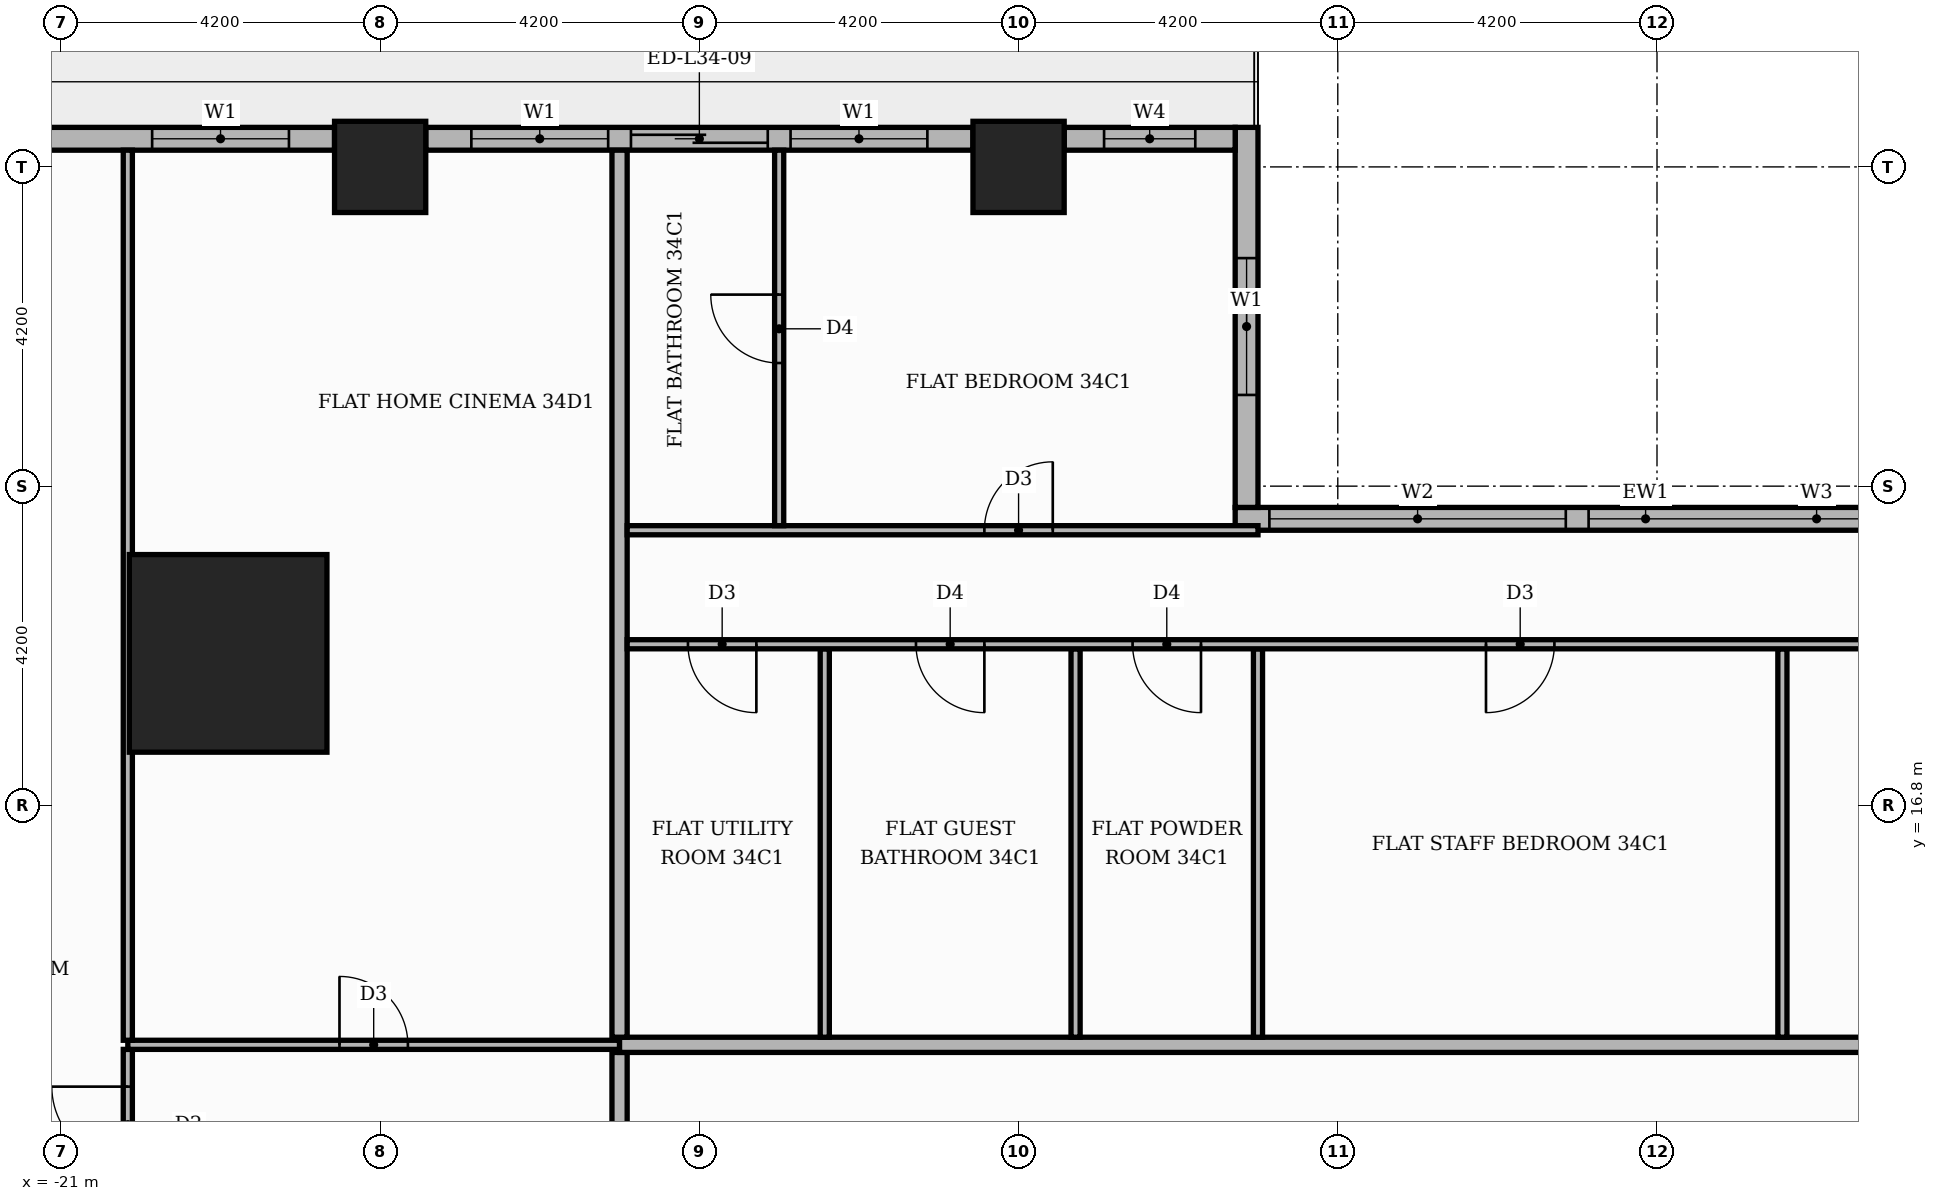
"""IFC4 building model, lengths in metres.
Left out: names, types, materials, properties, quantities, classifications, styles, units other than length and angle.
Written with IfcOpenShell. Run it as: python <this file> out.ifc"""

import sys

from ifc_helpers import new_model, si_unit, direction, frame, frame_2d, origin, origin_2d, place, context, subcontext, project, spatial, rectangle, extrude, element, fill, save


model = new_model("IFC4")
c1 = context("Model", 3, precision=1e-05, world=origin(), true_north=direction((0.0, 1.0)))
c2 = subcontext(c1, "Body", "Model", "MODEL_VIEW")
j1 = project(units=[si_unit("LENGTHUNIT", "METRE"), si_unit("PLANEANGLEUNIT", "RADIAN")], contexts=[c1])
p1 = place(None, origin())
s1 = spatial("IfcSite", under=j1, at=p1, CompositionType="ELEMENT")
p2 = place(p1, origin())
s2 = spatial("IfcBuilding", under=s1, at=p2, CompositionType="ELEMENT")
p3 = place(p2, frame((0.0, 0.0, 145.5)))
s3 = spatial("IfcBuildingStorey", under=s2, at=p3, CompositionType="ELEMENT", Elevation=145.5)
p4 = place(p3, frame((-18.8, 18.8, 0.0), z_axis=(0.0, 0.0, 1.0), x_axis=(1.0, 0.0, 0.0)))
e1 = element("IfcColumn", 1, at=p4, inside=s3, PredefinedType="COLUMN", context=c2, shape_type="SweptSolid", body=[
    extrude(rectangle(XDim=2.6, YDim=2.6, at=origin_2d()), origin(), (0.0, 0.0, 1.0), 3.9),
])
for number, where, z_axis, x_axis in (
    (2, (-8.4, 25.2, 0.0), (0.0, 0.0, 1.0), (1.0, 0.0, 0.0)),
    (3, (-16.8, 25.2, 0.0), (0.0, 0.0, 1.0), (1.0, 0.0, 0.0)),
):
    element("IfcColumn", number, at=place(p3, frame(where, z_axis=z_axis, x_axis=x_axis)), inside=s3, PredefinedType="COLUMN", context=c2, shape_type="SweptSolid", body=[
        extrude(rectangle(XDim=1.2, YDim=1.2, at=origin_2d()), origin(), (0.0, 0.0, 1.0), 3.9),
    ])
p5 = place(p3, frame((5.25, 20.57, 0.0), z_axis=(0.0, 0.0, 1.0), x_axis=(-1.0, 0.0, 0.0)))
e4 = element("IfcWall", 4, at=p5, inside=s3, PredefinedType="STANDARD", context=c2, shape_type="SweptSolid", body=[
    extrude(rectangle(XDim=10.8, YDim=0.3, at=frame_2d((5.4, 0.0))), origin(), (0.0, 0.0, 1.0), 3.48),
])
p6 = place(p5, frame((0.15, 0.0, 0.9)))
e5 = element("IfcOpeningElement", 5, at=p6, cuts=e4, PredefinedType="OPENING", context=c2, shape_type="SweptSolid", body=[
    extrude(rectangle(XDim=6.0, YDim=2.1, at=frame_2d((3.0, 1.05))), frame((0.0, 0.16, 0.0), z_axis=(0.0, -1.0, 0.0), x_axis=(1.0, 0.0, 0.0)), (0.0, 0.0, 1.0), 0.32),
])
p7 = place(p5, frame((6.45, 0.0, 0.9)))
e6 = element("IfcOpeningElement", 6, at=p7, cuts=e4, PredefinedType="OPENING", context=c2, shape_type="SweptSolid", body=[
    extrude(rectangle(XDim=3.9, YDim=2.1, at=frame_2d((1.95, 1.05))), frame((0.0, 0.16, 0.0), z_axis=(0.0, -1.0, 0.0), x_axis=(1.0, 0.0, 0.0)), (0.0, 0.0, 1.0), 0.32),
])
p8 = place(p3, frame((-5.4, 20.72, 0.0), z_axis=(0.0, 0.0, 1.0), x_axis=(0.0, 1.0, 0.0)))
e7 = element("IfcWall", 7, at=p8, inside=s3, PredefinedType="STANDARD", context=c2, shape_type="SweptSolid", body=[
    extrude(rectangle(XDim=5.0, YDim=0.3, at=frame_2d((2.5, 0.0))), origin(), (0.0, 0.0, 1.0), 3.48),
])
p9 = place(p8, frame((1.48, 0.0, 0.9)))
e8 = element("IfcOpeningElement", 8, at=p9, cuts=e7, PredefinedType="OPENING", context=c2, shape_type="SweptSolid", body=[
    extrude(rectangle(XDim=1.8, YDim=2.1, at=frame_2d((0.9, 1.05))), frame((0.0, 0.16, 0.0), z_axis=(0.0, -1.0, 0.0), x_axis=(1.0, 0.0, 0.0)), (0.0, 0.0, 1.0), 0.32),
])
p10 = place(p3, frame((-5.55, 25.57, 0.0), z_axis=(0.0, 0.0, 1.0), x_axis=(-1.0, 0.0, 0.0)))
e9 = element("IfcWall", 9, at=p10, inside=s3, PredefinedType="STANDARD", context=c2, shape_type="SweptSolid", body=[
    extrude(rectangle(XDim=2.25, YDim=0.3, at=frame_2d((1.125, 0.0))), origin(), (0.0, 0.0, 1.0), 3.48),
])
p11 = place(p10, frame((0.525, 0.0, 0.9)))
e10 = element("IfcOpeningElement", 10, at=p11, cuts=e9, PredefinedType="OPENING", context=c2, shape_type="SweptSolid", body=[
    extrude(rectangle(XDim=1.2, YDim=2.1, at=frame_2d((0.6, 1.05))), frame((0.0, 0.16, 0.0), z_axis=(0.0, -1.0, 0.0), x_axis=(1.0, 0.0, 0.0)), (0.0, 0.0, 1.0), 0.32),
])
p12 = place(p3, frame((-9.0, 25.57, 0.0), z_axis=(0.0, 0.0, 1.0), x_axis=(-1.0, 0.0, 0.0)))
e11 = element("IfcWall", 11, at=p12, inside=s3, PredefinedType="STANDARD", context=c2, shape_type="SweptSolid", body=[
    extrude(rectangle(XDim=7.2, YDim=0.3, at=frame_2d((3.6, 0.0))), origin(), (0.0, 0.0, 1.0), 3.48),
])
p13 = place(p12, frame((0.6, 0.0, 0.9)))
e12 = element("IfcOpeningElement", 12, at=p13, cuts=e11, PredefinedType="OPENING", context=c2, shape_type="SweptSolid", body=[
    extrude(rectangle(XDim=1.8, YDim=2.1, at=frame_2d((0.9, 1.05))), frame((0.0, 0.16, 0.0), z_axis=(0.0, -1.0, 0.0), x_axis=(1.0, 0.0, 0.0)), (0.0, 0.0, 1.0), 0.32),
])
p14 = place(p12, frame((2.7, 0.0, 0.0)))
e13 = element("IfcOpeningElement", 13, at=p14, cuts=e11, PredefinedType="OPENING", context=c2, shape_type="SweptSolid", body=[
    extrude(rectangle(XDim=1.8, YDim=2.4, at=frame_2d((0.9, 1.2))), frame((0.0, 0.16, 0.0), z_axis=(0.0, -1.0, 0.0), x_axis=(1.0, 0.0, 0.0)), (0.0, 0.0, 1.0), 0.32),
])
p15 = place(p12, frame((4.8, 0.0, 0.9)))
e14 = element("IfcOpeningElement", 14, at=p15, cuts=e11, PredefinedType="OPENING", context=c2, shape_type="SweptSolid", body=[
    extrude(rectangle(XDim=1.8, YDim=2.1, at=frame_2d((0.9, 1.05))), frame((0.0, 0.16, 0.0), z_axis=(0.0, -1.0, 0.0), x_axis=(1.0, 0.0, 0.0)), (0.0, 0.0, 1.0), 0.32),
])
p16 = place(p3, frame((-17.4, 25.57, 0.0), z_axis=(0.0, 0.0, 1.0), x_axis=(-1.0, 0.0, 0.0)))
e15 = element("IfcWall", 15, at=p16, inside=s3, PredefinedType="STANDARD", context=c2, shape_type="SweptSolid", body=[
    extrude(rectangle(XDim=4.32, YDim=0.3, at=frame_2d((2.16, 0.0))), origin(), (0.0, 0.0, 1.0), 3.48),
])
p17 = place(p16, frame((0.6, 0.0, 0.9)))
e16 = element("IfcOpeningElement", 16, at=p17, cuts=e15, PredefinedType="OPENING", context=c2, shape_type="SweptSolid", body=[
    extrude(rectangle(XDim=1.8, YDim=2.1, at=frame_2d((0.9, 1.05))), frame((0.0, 0.16, 0.0), z_axis=(0.0, -1.0, 0.0), x_axis=(1.0, 0.0, 0.0)), (0.0, 0.0, 1.0), 0.32),
])
p18 = place(p3, frame((-13.65, 11.1, 0.0), z_axis=(0.0, 0.0, 1.0), x_axis=(0.0, 1.0, 0.0)))
e17 = element("IfcWall", 17, at=p18, inside=s3, PredefinedType="PARTITIONING", context=c2, shape_type="SweptSolid", body=[
    extrude(rectangle(XDim=2.45, YDim=0.2, at=frame_2d((1.225, 0.0))), origin(), (0.0, 0.0, 1.0), 3.48),
])
p19 = place(p3, frame((-20.12, 11.61, 0.0), z_axis=(0.0, 0.0, 1.0), x_axis=(0.0, 1.0, 0.0)))
e18 = element("IfcWall", 18, at=p19, inside=s3, PredefinedType="PARTITIONING", context=c2, shape_type="SweptSolid", body=[
    extrude(rectangle(XDim=1.98, YDim=0.12, at=frame_2d((0.99, 0.0))), origin(), (0.0, 0.0, 1.0), 3.48),
])
p20 = place(p19, frame((0.49, 0.0, 0.0)))
e19 = element("IfcOpeningElement", 19, at=p20, cuts=e18, PredefinedType="OPENING", context=c2, shape_type="SweptSolid", body=[
    extrude(rectangle(XDim=1.0, YDim=2.1, at=frame_2d((0.5, 1.05))), frame((0.0, 0.07, 0.0), z_axis=(0.0, -1.0, 0.0), x_axis=(1.0, 0.0, 0.0)), (0.0, 0.0, 1.0), 0.14),
])
p21 = place(p3, frame((-20.12, 13.65, 0.0), z_axis=(0.0, 0.0, 1.0), x_axis=(1.0, 0.0, 0.0)))
e20 = element("IfcWall", 20, at=p21, inside=s3, PredefinedType="PARTITIONING", context=c2, shape_type="SweptSolid", body=[
    extrude(rectangle(XDim=6.47, YDim=0.12, at=frame_2d((3.235, 0.0))), origin(), (0.0, 0.0, 1.0), 3.48),
])
p22 = place(p21, frame((2.785, 0.0, 0.0)))
e21 = element("IfcOpeningElement", 21, at=p22, cuts=e20, PredefinedType="OPENING", context=c2, shape_type="SweptSolid", body=[
    extrude(rectangle(XDim=0.9, YDim=2.1, at=frame_2d((0.45, 1.05))), frame((0.0, 0.07, 0.0), z_axis=(0.0, -1.0, 0.0), x_axis=(1.0, 0.0, 0.0)), (0.0, 0.0, 1.0), 0.14),
])
p23 = place(p3, frame((-13.65, 13.65, 0.0), z_axis=(0.0, 0.0, 1.0), x_axis=(1.0, 0.0, 0.0)))
e22 = element("IfcWall", 22, at=p23, inside=s3, PredefinedType="PARTITIONING", context=c2, shape_type="SweptSolid", body=[
    extrude(rectangle(XDim=39.07, YDim=0.2, at=frame_2d((19.535, 0.0))), origin(), (0.0, 0.0, 1.0), 3.48),
])
p24 = place(p23, frame((23.6, 0.0, 0.0)))
e23 = element("IfcOpeningElement", 23, at=p24, cuts=e22, PredefinedType="OPENING", context=c2, shape_type="SweptSolid", body=[
    extrude(rectangle(XDim=1.1, YDim=2.4, at=frame_2d((0.55, 1.2))), frame((0.0, 0.11, 0.0), z_axis=(0.0, -1.0, 0.0), x_axis=(1.0, 0.0, 0.0)), (0.0, 0.0, 1.0), 0.22),
])
p25 = place(p3, frame((-20.12, 13.71, 0.0), z_axis=(0.0, 0.0, 1.0), x_axis=(0.0, 1.0, 0.0)))
e24 = element("IfcWall", 24, at=p25, inside=s3, PredefinedType="PARTITIONING", context=c2, shape_type="SweptSolid", body=[
    extrude(rectangle(XDim=11.71, YDim=0.12, at=frame_2d((5.855, 0.0))), origin(), (0.0, 0.0, 1.0), 3.48),
])
p26 = place(p3, frame((-13.65, 13.75, 0.0), z_axis=(0.0, 0.0, 1.0), x_axis=(0.0, 1.0, 0.0)))
e25 = element("IfcWall", 25, at=p26, inside=s3, PredefinedType="PARTITIONING", context=c2, shape_type="SweptSolid", body=[
    extrude(rectangle(XDim=11.67, YDim=0.2, at=frame_2d((5.835, 0.0))), origin(), (0.0, 0.0, 1.0), 3.48),
])
for number, where, z_axis, x_axis in (
    (26, (-10.95, 13.75, 0.0), (0.0, 0.0, 1.0), (0.0, 1.0, 0.0)),
    (27, (-7.65, 13.75, 0.0), (0.0, 0.0, 1.0), (0.0, 1.0, 0.0)),
    (28, (-5.25, 13.75, 0.0), (0.0, 0.0, 1.0), (0.0, 1.0, 0.0)),
    (29, (1.65, 13.75, 0.0), (0.0, 0.0, 1.0), (0.0, 1.0, 0.0)),
):
    element("IfcWall", number, at=place(p3, frame(where, z_axis=z_axis, x_axis=x_axis)), inside=s3, PredefinedType="PARTITIONING", context=c2, shape_type="SweptSolid", body=[
        extrude(rectangle(XDim=5.11, YDim=0.12, at=frame_2d((2.555, 0.0))), origin(), (0.0, 0.0, 1.0), 3.48),
    ])
p27 = place(p3, frame((-13.55, 18.92, 0.0), z_axis=(0.0, 0.0, 1.0), x_axis=(1.0, 0.0, 0.0)))
e30 = element("IfcWall", 30, at=p27, inside=s3, PredefinedType="PARTITIONING", context=c2, shape_type="SweptSolid", body=[
    extrude(rectangle(XDim=20.9, YDim=0.12, at=frame_2d((10.45, 0.0))), origin(), (0.0, 0.0, 1.0), 3.48),
])
p28 = place(p27, frame((17.6, 0.0, 0.0)))
e31 = element("IfcOpeningElement", 31, at=p28, cuts=e30, PredefinedType="OPENING", context=c2, shape_type="SweptSolid", body=[
    extrude(rectangle(XDim=0.9, YDim=2.1, at=frame_2d((0.45, 1.05))), frame((0.0, 0.07, 0.0), z_axis=(0.0, -1.0, 0.0), x_axis=(1.0, 0.0, 0.0)), (0.0, 0.0, 1.0), 0.14),
])
p29 = place(p27, frame((11.3, 0.0, 0.0)))
e32 = element("IfcOpeningElement", 32, at=p29, cuts=e30, PredefinedType="OPENING", context=c2, shape_type="SweptSolid", body=[
    extrude(rectangle(XDim=0.9, YDim=2.1, at=frame_2d((0.45, 1.05))), frame((0.0, 0.07, 0.0), z_axis=(0.0, -1.0, 0.0), x_axis=(1.0, 0.0, 0.0)), (0.0, 0.0, 1.0), 0.14),
])
p30 = place(p27, frame((6.65, 0.0, 0.0)))
e33 = element("IfcOpeningElement", 33, at=p30, cuts=e30, PredefinedType="OPENING", context=c2, shape_type="SweptSolid", body=[
    extrude(rectangle(XDim=0.9, YDim=2.1, at=frame_2d((0.45, 1.05))), frame((0.0, 0.07, 0.0), z_axis=(0.0, -1.0, 0.0), x_axis=(1.0, 0.0, 0.0)), (0.0, 0.0, 1.0), 0.14),
])
p31 = place(p27, frame((3.8, 0.0, 0.0)))
e34 = element("IfcOpeningElement", 34, at=p31, cuts=e30, PredefinedType="OPENING", context=c2, shape_type="SweptSolid", body=[
    extrude(rectangle(XDim=0.9, YDim=2.1, at=frame_2d((0.45, 1.05))), frame((0.0, 0.07, 0.0), z_axis=(0.0, -1.0, 0.0), x_axis=(1.0, 0.0, 0.0)), (0.0, 0.0, 1.0), 0.14),
])
p32 = place(p27, frame((0.8, 0.0, 0.0)))
e35 = element("IfcOpeningElement", 35, at=p32, cuts=e30, PredefinedType="OPENING", context=c2, shape_type="SweptSolid", body=[
    extrude(rectangle(XDim=0.9, YDim=2.1, at=frame_2d((0.45, 1.05))), frame((0.0, 0.07, 0.0), z_axis=(0.0, -1.0, 0.0), x_axis=(1.0, 0.0, 0.0)), (0.0, 0.0, 1.0), 0.14),
])
p33 = place(p3, frame((-13.55, 20.42, 0.0), z_axis=(0.0, 0.0, 1.0), x_axis=(1.0, 0.0, 0.0)))
e36 = element("IfcWall", 36, at=p33, inside=s3, PredefinedType="PARTITIONING", context=c2, shape_type="SweptSolid", body=[
    extrude(rectangle(XDim=8.3, YDim=0.12, at=frame_2d((4.15, 0.0))), origin(), (0.0, 0.0, 1.0), 3.48),
])
p34 = place(p33, frame((4.7, 0.0, 0.0)))
e37 = element("IfcOpeningElement", 37, at=p34, cuts=e36, PredefinedType="OPENING", context=c2, shape_type="SweptSolid", body=[
    extrude(rectangle(XDim=0.9, YDim=2.1, at=frame_2d((0.45, 1.05))), frame((0.0, 0.07, 0.0), z_axis=(0.0, -1.0, 0.0), x_axis=(1.0, 0.0, 0.0)), (0.0, 0.0, 1.0), 0.14),
])
p35 = place(p3, frame((-11.55, 20.48, 0.0), z_axis=(0.0, 0.0, 1.0), x_axis=(0.0, 1.0, 0.0)))
e38 = element("IfcWall", 38, at=p35, inside=s3, PredefinedType="PARTITIONING", context=c2, shape_type="SweptSolid", body=[
    extrude(rectangle(XDim=4.94, YDim=0.12, at=frame_2d((2.47, 0.0))), origin(), (0.0, 0.0, 1.0), 3.48),
])
p36 = place(p35, frame((2.14, 0.0, 0.0)))
e39 = element("IfcOpeningElement", 39, at=p36, cuts=e38, PredefinedType="OPENING", context=c2, shape_type="SweptSolid", body=[
    extrude(rectangle(XDim=0.9, YDim=2.1, at=frame_2d((0.45, 1.05))), frame((0.0, 0.07, 0.0), z_axis=(0.0, -1.0, 0.0), x_axis=(1.0, 0.0, 0.0)), (0.0, 0.0, 1.0), 0.14),
])
p37 = place(p6, origin())
e40 = element("IfcWindow", 40, at=p37, inside=s3, PartitioningType="SINGLE_PANEL", PredefinedType="WINDOW", context=c2, shape_type="SweptSolid", body=[
    extrude(rectangle(XDim=6.0, YDim=2.1, at=frame_2d((3.0, 1.05))), frame((0.0, 0.03, 0.0), z_axis=(0.0, -1.0, 0.0), x_axis=(1.0, 0.0, 0.0)), (0.0, 0.0, 1.0), 0.06),
])
fill(e5, e40)
p38 = place(p7, origin())
e41 = element("IfcWindow", 41, at=p38, inside=s3, PartitioningType="SINGLE_PANEL", PredefinedType="WINDOW", context=c2, shape_type="SweptSolid", body=[
    extrude(rectangle(XDim=3.9, YDim=2.1, at=frame_2d((1.95, 1.05))), frame((0.0, 0.03, 0.0), z_axis=(0.0, -1.0, 0.0), x_axis=(1.0, 0.0, 0.0)), (0.0, 0.0, 1.0), 0.06),
])
fill(e6, e41)
p39 = place(p9, origin())
e42 = element("IfcWindow", 42, at=p39, inside=s3, PartitioningType="SINGLE_PANEL", PredefinedType="WINDOW", context=c2, shape_type="SweptSolid", body=[
    extrude(rectangle(XDim=1.8, YDim=2.1, at=frame_2d((0.9, 1.05))), frame((0.0, 0.03, 0.0), z_axis=(0.0, -1.0, 0.0), x_axis=(1.0, 0.0, 0.0)), (0.0, 0.0, 1.0), 0.06),
])
fill(e8, e42)
p40 = place(p11, origin())
e43 = element("IfcWindow", 43, at=p40, inside=s3, PartitioningType="SINGLE_PANEL", PredefinedType="WINDOW", context=c2, shape_type="SweptSolid", body=[
    extrude(rectangle(XDim=1.2, YDim=2.1, at=frame_2d((0.6, 1.05))), frame((0.0, 0.03, 0.0), z_axis=(0.0, -1.0, 0.0), x_axis=(1.0, 0.0, 0.0)), (0.0, 0.0, 1.0), 0.06),
])
fill(e10, e43)
p41 = place(p13, origin())
e44 = element("IfcWindow", 44, at=p41, inside=s3, PartitioningType="SINGLE_PANEL", PredefinedType="WINDOW", context=c2, shape_type="SweptSolid", body=[
    extrude(rectangle(XDim=1.8, YDim=2.1, at=frame_2d((0.9, 1.05))), frame((0.0, 0.03, 0.0), z_axis=(0.0, -1.0, 0.0), x_axis=(1.0, 0.0, 0.0)), (0.0, 0.0, 1.0), 0.06),
])
fill(e12, e44)
p42 = place(p14, origin())
e45 = element("IfcDoor", 45, at=p42, inside=s3, OperationType="SLIDING_TO_RIGHT", PredefinedType="DOOR", context=c2, shape_type="SweptSolid", body=[
    extrude(rectangle(XDim=1.8, YDim=2.4, at=frame_2d((0.9, 1.2))), frame((0.0, 0.025, 0.0), z_axis=(0.0, -1.0, 0.0), x_axis=(1.0, 0.0, 0.0)), (0.0, 0.0, 1.0), 0.05),
])
fill(e13, e45)
p43 = place(p15, origin())
e46 = element("IfcWindow", 46, at=p43, inside=s3, PartitioningType="SINGLE_PANEL", PredefinedType="WINDOW", context=c2, shape_type="SweptSolid", body=[
    extrude(rectangle(XDim=1.8, YDim=2.1, at=frame_2d((0.9, 1.05))), frame((0.0, 0.03, 0.0), z_axis=(0.0, -1.0, 0.0), x_axis=(1.0, 0.0, 0.0)), (0.0, 0.0, 1.0), 0.06),
])
fill(e14, e46)
p44 = place(p17, origin())
e47 = element("IfcWindow", 47, at=p44, inside=s3, PartitioningType="SINGLE_PANEL", PredefinedType="WINDOW", context=c2, shape_type="SweptSolid", body=[
    extrude(rectangle(XDim=1.8, YDim=2.1, at=frame_2d((0.9, 1.05))), frame((0.0, 0.03, 0.0), z_axis=(0.0, -1.0, 0.0), x_axis=(1.0, 0.0, 0.0)), (0.0, 0.0, 1.0), 0.06),
])
fill(e16, e47)
p45 = place(p29, frame((0.9, 0.0, 0.0), z_axis=(0.0, 0.0, 1.0), x_axis=(-1.0, 0.0, 0.0)))
e48 = element("IfcDoor", 48, at=p45, inside=s3, OperationType="SINGLE_SWING_LEFT", PredefinedType="DOOR", context=c2, shape_type="SweptSolid", body=[
    extrude(rectangle(XDim=0.9, YDim=2.1, at=frame_2d((0.45, 1.05))), frame((0.0, 0.025, 0.0), z_axis=(0.0, -1.0, 0.0), x_axis=(1.0, 0.0, 0.0)), (0.0, 0.0, 1.0), 0.05),
])
fill(e32, e48)
p46 = place(p30, frame((0.9, 0.0, 0.0), z_axis=(0.0, 0.0, 1.0), x_axis=(-1.0, 0.0, 0.0)))
e49 = element("IfcDoor", 49, at=p46, inside=s3, OperationType="SINGLE_SWING_RIGHT", PredefinedType="DOOR", context=c2, shape_type="SweptSolid", body=[
    extrude(rectangle(XDim=0.9, YDim=2.1, at=frame_2d((0.45, 1.05))), frame((0.0, 0.025, 0.0), z_axis=(0.0, -1.0, 0.0), x_axis=(1.0, 0.0, 0.0)), (0.0, 0.0, 1.0), 0.05),
])
fill(e33, e49)
p47 = place(p31, frame((0.9, 0.0, 0.0), z_axis=(0.0, 0.0, 1.0), x_axis=(-1.0, 0.0, 0.0)))
e50 = element("IfcDoor", 50, at=p47, inside=s3, OperationType="SINGLE_SWING_RIGHT", PredefinedType="DOOR", context=c2, shape_type="SweptSolid", body=[
    extrude(rectangle(XDim=0.9, YDim=2.1, at=frame_2d((0.45, 1.05))), frame((0.0, 0.025, 0.0), z_axis=(0.0, -1.0, 0.0), x_axis=(1.0, 0.0, 0.0)), (0.0, 0.0, 1.0), 0.05),
])
fill(e34, e50)
p48 = place(p32, frame((0.9, 0.0, 0.0), z_axis=(0.0, 0.0, 1.0), x_axis=(-1.0, 0.0, 0.0)))
e51 = element("IfcDoor", 51, at=p48, inside=s3, OperationType="SINGLE_SWING_RIGHT", PredefinedType="DOOR", context=c2, shape_type="SweptSolid", body=[
    extrude(rectangle(XDim=0.9, YDim=2.1, at=frame_2d((0.45, 1.05))), frame((0.0, 0.025, 0.0), z_axis=(0.0, -1.0, 0.0), x_axis=(1.0, 0.0, 0.0)), (0.0, 0.0, 1.0), 0.05),
])
fill(e35, e51)
p49 = place(p34, origin())
e52 = element("IfcDoor", 52, at=p49, inside=s3, OperationType="SINGLE_SWING_RIGHT", PredefinedType="DOOR", context=c2, shape_type="SweptSolid", body=[
    extrude(rectangle(XDim=0.9, YDim=2.1, at=frame_2d((0.45, 1.05))), frame((0.0, 0.025, 0.0), z_axis=(0.0, -1.0, 0.0), x_axis=(1.0, 0.0, 0.0)), (0.0, 0.0, 1.0), 0.05),
])
fill(e37, e52)
p50 = place(p36, origin())
e53 = element("IfcDoor", 53, at=p50, inside=s3, OperationType="SINGLE_SWING_RIGHT", PredefinedType="DOOR", context=c2, shape_type="SweptSolid", body=[
    extrude(rectangle(XDim=0.9, YDim=2.1, at=frame_2d((0.45, 1.05))), frame((0.0, 0.025, 0.0), z_axis=(0.0, -1.0, 0.0), x_axis=(1.0, 0.0, 0.0)), (0.0, 0.0, 1.0), 0.05),
])
fill(e39, e53)
p51 = place(p22, origin())
e54 = element("IfcDoor", 54, at=p51, inside=s3, OperationType="SINGLE_SWING_LEFT", PredefinedType="DOOR", context=c2, shape_type="SweptSolid", body=[
    extrude(rectangle(XDim=0.9, YDim=2.1, at=frame_2d((0.45, 1.05))), frame((0.0, 0.025, 0.0), z_axis=(0.0, -1.0, 0.0), x_axis=(1.0, 0.0, 0.0)), (0.0, 0.0, 1.0), 0.05),
])
fill(e21, e54)
p52 = place(p20, origin())
e55 = element("IfcDoor", 55, at=p52, inside=s3, OperationType="SINGLE_SWING_RIGHT", PredefinedType="DOOR", context=c2, shape_type="SweptSolid", body=[
    extrude(rectangle(XDim=1.0, YDim=2.1, at=frame_2d((0.5, 1.05))), frame((0.0, 0.025, 0.0), z_axis=(0.0, -1.0, 0.0), x_axis=(1.0, 0.0, 0.0)), (0.0, 0.0, 1.0), 0.05),
])
fill(e19, e55)
save(model, sys.argv[1])
